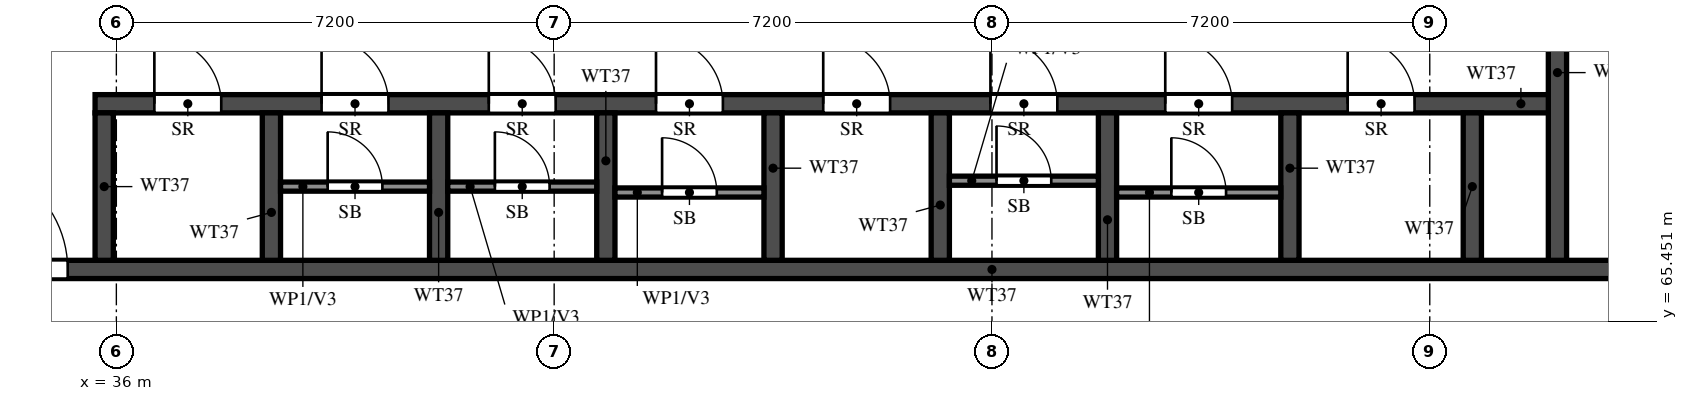
"""IFC4 building model, lengths in metres.
Left out: names, types, materials, properties, quantities, classifications, styles, units other than length and angle.
Written with IfcOpenShell. Run it as: python <this file> out.ifc"""

import sys

from ifc_helpers import new_model, si_unit, direction, frame, frame_2d, origin, place, context, subcontext, project, spatial, rectangle, extrude, element, fill, save


model = new_model("IFC4")
c1 = context("Model", 3, precision=1e-05, world=origin(), true_north=direction((0.0, 1.0)))
c2 = subcontext(c1, "Body", "Model", "MODEL_VIEW")
j1 = project(units=[si_unit("LENGTHUNIT", "METRE"), si_unit("PLANEANGLEUNIT", "RADIAN")], contexts=[c1])
p1 = place(None, origin())
s1 = spatial("IfcSite", under=j1, at=p1, CompositionType="ELEMENT")
p2 = place(p1, origin())
s2 = spatial("IfcBuilding", under=s1, at=p2, CompositionType="ELEMENT")
p3 = place(p2, frame((0.0, 0.0, 218.5)))
s3 = spatial("IfcBuildingStorey", under=s2, at=p3, CompositionType="ELEMENT", Elevation=218.5)
p4 = place(p3, frame((29.2, 66.3, 0.0), z_axis=(0.0, 0.0, 1.0), x_axis=(1.0, 0.0, 0.0)))
e1 = element("IfcWall", 1, at=p4, inside=s3, PredefinedType="SHEAR", context=c2, shape_type="SweptSolid", body=[
    extrude(rectangle(XDim=42.4, YDim=0.3, at=frame_2d((21.2, 0.0))), origin(), (0.0, 0.0, 1.0), 3.22),
])
p5 = place(p4, frame((1.425, 0.0, 0.0)))
e2 = element("IfcOpeningElement", 2, at=p5, cuts=e1, PredefinedType="OPENING", context=c2, shape_type="SweptSolid", body=[
    extrude(rectangle(XDim=1.1, YDim=2.1, at=frame_2d((0.55, 1.05))), frame((0.0, 0.16, 0.0), z_axis=(0.0, -1.0, 0.0), x_axis=(1.0, 0.0, 0.0)), (0.0, 0.0, 1.0), 0.32),
])
p6 = place(p4, frame((4.2, 0.0, 0.0)))
e3 = element("IfcOpeningElement", 3, at=p6, cuts=e1, PredefinedType="OPENING", context=c2, shape_type="SweptSolid", body=[
    extrude(rectangle(XDim=1.8, YDim=2.1, at=frame_2d((0.9, 1.05))), frame((0.0, 0.16, 0.0), z_axis=(0.0, -1.0, 0.0), x_axis=(1.0, 0.0, 0.0)), (0.0, 0.0, 1.0), 0.32),
])
p7 = place(p3, frame((35.65, 69.025, 0.0), z_axis=(0.0, 0.0, 1.0), x_axis=(1.0, 0.0, 0.0)))
e4 = element("IfcWall", 4, at=p7, inside=s3, PredefinedType="SHEAR", context=c2, shape_type="SweptSolid", body=[
    extrude(rectangle(XDim=24.05, YDim=0.3, at=frame_2d((12.025, 0.0))), origin(), (0.0, 0.0, 1.0), 3.22),
])
p8 = place(p7, frame((0.975, 0.0, 0.0)))
e5 = element("IfcOpeningElement", 5, at=p8, cuts=e4, PredefinedType="OPENING", context=c2, shape_type="SweptSolid", body=[
    extrude(rectangle(XDim=1.1, YDim=2.1, at=frame_2d((0.55, 1.05))), frame((0.0, 0.16, 0.0), z_axis=(0.0, -1.0, 0.0), x_axis=(1.0, 0.0, 0.0)), (0.0, 0.0, 1.0), 0.32),
])
p9 = place(p7, frame((3.725, 0.0, 0.0)))
e6 = element("IfcOpeningElement", 6, at=p9, cuts=e4, PredefinedType="OPENING", context=c2, shape_type="SweptSolid", body=[
    extrude(rectangle(XDim=1.1, YDim=2.1, at=frame_2d((0.55, 1.05))), frame((0.0, 0.16, 0.0), z_axis=(0.0, -1.0, 0.0), x_axis=(1.0, 0.0, 0.0)), (0.0, 0.0, 1.0), 0.32),
])
p10 = place(p7, frame((6.475, 0.0, 0.0)))
e7 = element("IfcOpeningElement", 7, at=p10, cuts=e4, PredefinedType="OPENING", context=c2, shape_type="SweptSolid", body=[
    extrude(rectangle(XDim=1.1, YDim=2.1, at=frame_2d((0.55, 1.05))), frame((0.0, 0.16, 0.0), z_axis=(0.0, -1.0, 0.0), x_axis=(1.0, 0.0, 0.0)), (0.0, 0.0, 1.0), 0.32),
])
p11 = place(p7, frame((9.225, 0.0, 0.0)))
e8 = element("IfcOpeningElement", 8, at=p11, cuts=e4, PredefinedType="OPENING", context=c2, shape_type="SweptSolid", body=[
    extrude(rectangle(XDim=1.1, YDim=2.1, at=frame_2d((0.55, 1.05))), frame((0.0, 0.16, 0.0), z_axis=(0.0, -1.0, 0.0), x_axis=(1.0, 0.0, 0.0)), (0.0, 0.0, 1.0), 0.32),
])
p12 = place(p7, frame((11.975, 0.0, 0.0)))
e9 = element("IfcOpeningElement", 9, at=p12, cuts=e4, PredefinedType="OPENING", context=c2, shape_type="SweptSolid", body=[
    extrude(rectangle(XDim=1.1, YDim=2.1, at=frame_2d((0.55, 1.05))), frame((0.0, 0.16, 0.0), z_axis=(0.0, -1.0, 0.0), x_axis=(1.0, 0.0, 0.0)), (0.0, 0.0, 1.0), 0.32),
])
p13 = place(p7, frame((14.725, 0.0, 0.0)))
e10 = element("IfcOpeningElement", 10, at=p13, cuts=e4, PredefinedType="OPENING", context=c2, shape_type="SweptSolid", body=[
    extrude(rectangle(XDim=1.1, YDim=2.1, at=frame_2d((0.55, 1.05))), frame((0.0, 0.16, 0.0), z_axis=(0.0, -1.0, 0.0), x_axis=(1.0, 0.0, 0.0)), (0.0, 0.0, 1.0), 0.32),
])
p14 = place(p7, frame((17.6, 0.0, 0.0)))
e11 = element("IfcOpeningElement", 11, at=p14, cuts=e4, PredefinedType="OPENING", context=c2, shape_type="SweptSolid", body=[
    extrude(rectangle(XDim=1.1, YDim=2.1, at=frame_2d((0.55, 1.05))), frame((0.0, 0.16, 0.0), z_axis=(0.0, -1.0, 0.0), x_axis=(1.0, 0.0, 0.0)), (0.0, 0.0, 1.0), 0.32),
])
p15 = place(p7, frame((20.6, 0.0, 0.0)))
e12 = element("IfcOpeningElement", 12, at=p15, cuts=e4, PredefinedType="OPENING", context=c2, shape_type="SweptSolid", body=[
    extrude(rectangle(XDim=1.1, YDim=2.1, at=frame_2d((0.55, 1.05))), frame((0.0, 0.16, 0.0), z_axis=(0.0, -1.0, 0.0), x_axis=(1.0, 0.0, 0.0)), (0.0, 0.0, 1.0), 0.32),
])
p16 = place(p3, frame((59.7, 66.45, 0.0), z_axis=(0.0, 0.0, 1.0), x_axis=(0.0, 1.0, 0.0)))
e13 = element("IfcWall", 13, at=p16, inside=s3, PredefinedType="SHEAR", context=c2, shape_type="SweptSolid", body=[
    extrude(rectangle(XDim=6.175, YDim=0.3, at=frame_2d((3.087, 0.0))), origin(), (0.0, 0.0, 1.0), 3.22),
])
p17 = place(p16, frame((3.85, 0.0, 0.0)))
e14 = element("IfcOpeningElement", 14, at=p17, cuts=e13, PredefinedType="OPENING", context=c2, shape_type="SweptSolid", body=[
    extrude(rectangle(XDim=1.2, YDim=2.1, at=frame_2d((0.6, 1.05))), frame((0.0, 0.16, 0.0), z_axis=(0.0, -1.0, 0.0), x_axis=(1.0, 0.0, 0.0)), (0.0, 0.0, 1.0), 0.32),
])
for number, where, z_axis, x_axis in (
    (15, (35.8, 66.45, 0.0), (0.0, 0.0, 1.0), (0.0, 1.0, 0.0)),
    (16, (38.55, 66.45, 0.0), (0.0, 0.0, 1.0), (0.0, 1.0, 0.0)),
    (17, (41.3, 66.45, 0.0), (0.0, 0.0, 1.0), (0.0, 1.0, 0.0)),
    (18, (44.05, 66.45, 0.0), (0.0, 0.0, 1.0), (0.0, 1.0, 0.0)),
    (19, (46.8, 66.45, 0.0), (0.0, 0.0, 1.0), (0.0, 1.0, 0.0)),
    (20, (49.55, 66.45, 0.0), (0.0, 0.0, 1.0), (0.0, 1.0, 0.0)),
    (21, (52.3, 66.45, 0.0), (0.0, 0.0, 1.0), (0.0, 1.0, 0.0)),
    (22, (55.3, 66.45, 0.0), (0.0, 0.0, 1.0), (0.0, 1.0, 0.0)),
    (23, (58.3, 66.45, 0.0), (0.0, 0.0, 1.0), (0.0, 1.0, 0.0)),
):
    element("IfcWall", number, at=place(p3, frame(where, z_axis=z_axis, x_axis=x_axis)), inside=s3, PredefinedType="SHEAR", context=c2, shape_type="SweptSolid", body=[
        extrude(rectangle(XDim=2.425, YDim=0.3, at=frame_2d((1.212, 0.0))), origin(), (0.0, 0.0, 1.0), 3.22),
    ])
p18 = place(p3, frame((38.7, 67.663, 0.0), z_axis=(0.0, 0.0, 1.0), x_axis=(1.0, 0.0, 0.0)))
e24 = element("IfcWall", 24, at=p18, inside=s3, PredefinedType="PARTITIONING", context=c2, shape_type="SweptSolid", body=[
    extrude(rectangle(XDim=2.45, YDim=0.15, at=frame_2d((1.225, 0.0))), origin(), (0.0, 0.0, 1.0), 3.22),
])
p19 = place(p18, frame((0.775, 0.0, 0.0)))
e25 = element("IfcOpeningElement", 25, at=p19, cuts=e24, PredefinedType="OPENING", context=c2, shape_type="SweptSolid", body=[
    extrude(rectangle(XDim=0.9, YDim=2.1, at=frame_2d((0.45, 1.05))), frame((0.0, 0.085, 0.0), z_axis=(0.0, -1.0, 0.0), x_axis=(1.0, 0.0, 0.0)), (0.0, 0.0, 1.0), 0.17),
])
p20 = place(p3, frame((41.45, 67.663, 0.0), z_axis=(0.0, 0.0, 1.0), x_axis=(1.0, 0.0, 0.0)))
e26 = element("IfcWall", 26, at=p20, inside=s3, PredefinedType="PARTITIONING", context=c2, shape_type="SweptSolid", body=[
    extrude(rectangle(XDim=2.45, YDim=0.15, at=frame_2d((1.225, 0.0))), origin(), (0.0, 0.0, 1.0), 3.22),
])
p21 = place(p20, frame((0.775, 0.0, 0.0)))
e27 = element("IfcOpeningElement", 27, at=p21, cuts=e26, PredefinedType="OPENING", context=c2, shape_type="SweptSolid", body=[
    extrude(rectangle(XDim=0.9, YDim=2.1, at=frame_2d((0.45, 1.05))), frame((0.0, 0.085, 0.0), z_axis=(0.0, -1.0, 0.0), x_axis=(1.0, 0.0, 0.0)), (0.0, 0.0, 1.0), 0.17),
])
p22 = place(p3, frame((44.2, 67.565, 0.0), z_axis=(0.0, 0.0, 1.0), x_axis=(1.0, 0.0, 0.0)))
e28 = element("IfcWall", 28, at=p22, inside=s3, PredefinedType="PARTITIONING", context=c2, shape_type="SweptSolid", body=[
    extrude(rectangle(XDim=2.45, YDim=0.15, at=frame_2d((1.225, 0.0))), origin(), (0.0, 0.0, 1.0), 3.22),
])
p23 = place(p22, frame((0.775, 0.0, 0.0)))
e29 = element("IfcOpeningElement", 29, at=p23, cuts=e28, PredefinedType="OPENING", context=c2, shape_type="SweptSolid", body=[
    extrude(rectangle(XDim=0.9, YDim=2.1, at=frame_2d((0.45, 1.05))), frame((0.0, 0.085, 0.0), z_axis=(0.0, -1.0, 0.0), x_axis=(1.0, 0.0, 0.0)), (0.0, 0.0, 1.0), 0.17),
])
p24 = place(p3, frame((49.7, 67.76, 0.0), z_axis=(0.0, 0.0, 1.0), x_axis=(1.0, 0.0, 0.0)))
e30 = element("IfcWall", 30, at=p24, inside=s3, PredefinedType="PARTITIONING", context=c2, shape_type="SweptSolid", body=[
    extrude(rectangle(XDim=2.45, YDim=0.15, at=frame_2d((1.225, 0.0))), origin(), (0.0, 0.0, 1.0), 3.22),
])
p25 = place(p24, frame((0.775, 0.0, 0.0)))
e31 = element("IfcOpeningElement", 31, at=p25, cuts=e30, PredefinedType="OPENING", context=c2, shape_type="SweptSolid", body=[
    extrude(rectangle(XDim=0.9, YDim=2.1, at=frame_2d((0.45, 1.05))), frame((0.0, 0.085, 0.0), z_axis=(0.0, -1.0, 0.0), x_axis=(1.0, 0.0, 0.0)), (0.0, 0.0, 1.0), 0.17),
])
p26 = place(p3, frame((52.45, 67.565, 0.0), z_axis=(0.0, 0.0, 1.0), x_axis=(1.0, 0.0, 0.0)))
e32 = element("IfcWall", 32, at=p26, inside=s3, PredefinedType="PARTITIONING", context=c2, shape_type="SweptSolid", body=[
    extrude(rectangle(XDim=2.7, YDim=0.15, at=frame_2d((1.35, 0.0))), origin(), (0.0, 0.0, 1.0), 3.22),
])
p27 = place(p26, frame((0.9, 0.0, 0.0)))
e33 = element("IfcOpeningElement", 33, at=p27, cuts=e32, PredefinedType="OPENING", context=c2, shape_type="SweptSolid", body=[
    extrude(rectangle(XDim=0.9, YDim=2.1, at=frame_2d((0.45, 1.05))), frame((0.0, 0.085, 0.0), z_axis=(0.0, -1.0, 0.0), x_axis=(1.0, 0.0, 0.0)), (0.0, 0.0, 1.0), 0.17),
])
p28 = place(p6, origin())
e34 = element("IfcDoor", 34, at=p28, inside=s3, OperationType="DOUBLE_DOOR_SINGLE_SWING", PredefinedType="DOOR", context=c2, shape_type="SweptSolid", body=[
    extrude(rectangle(XDim=1.8, YDim=2.1, at=frame_2d((0.9, 1.05))), frame((0.0, 0.025, 0.0), z_axis=(0.0, -1.0, 0.0), x_axis=(1.0, 0.0, 0.0)), (0.0, 0.0, 1.0), 0.05),
])
fill(e3, e34)
p29 = place(p8, origin())
e35 = element("IfcDoor", 35, at=p29, inside=s3, OperationType="SINGLE_SWING_RIGHT", PredefinedType="DOOR", context=c2, shape_type="SweptSolid", body=[
    extrude(rectangle(XDim=1.1, YDim=2.1, at=frame_2d((0.55, 1.05))), frame((0.0, 0.025, 0.0), z_axis=(0.0, -1.0, 0.0), x_axis=(1.0, 0.0, 0.0)), (0.0, 0.0, 1.0), 0.05),
])
fill(e5, e35)
p30 = place(p9, origin())
e36 = element("IfcDoor", 36, at=p30, inside=s3, OperationType="SINGLE_SWING_LEFT", PredefinedType="DOOR", context=c2, shape_type="SweptSolid", body=[
    extrude(rectangle(XDim=1.1, YDim=2.1, at=frame_2d((0.55, 1.05))), frame((0.0, 0.025, 0.0), z_axis=(0.0, -1.0, 0.0), x_axis=(1.0, 0.0, 0.0)), (0.0, 0.0, 1.0), 0.05),
])
fill(e6, e36)
p31 = place(p19, origin())
e37 = element("IfcDoor", 37, at=p31, inside=s3, OperationType="SINGLE_SWING_LEFT", PredefinedType="DOOR", context=c2, shape_type="SweptSolid", body=[
    extrude(rectangle(XDim=0.9, YDim=2.1, at=frame_2d((0.45, 1.05))), frame((0.0, 0.025, 0.0), z_axis=(0.0, -1.0, 0.0), x_axis=(1.0, 0.0, 0.0)), (0.0, 0.0, 1.0), 0.05),
])
fill(e25, e37)
p32 = place(p10, origin())
e38 = element("IfcDoor", 38, at=p32, inside=s3, OperationType="SINGLE_SWING_RIGHT", PredefinedType="DOOR", context=c2, shape_type="SweptSolid", body=[
    extrude(rectangle(XDim=1.1, YDim=2.1, at=frame_2d((0.55, 1.05))), frame((0.0, 0.025, 0.0), z_axis=(0.0, -1.0, 0.0), x_axis=(1.0, 0.0, 0.0)), (0.0, 0.0, 1.0), 0.05),
])
fill(e7, e38)
p33 = place(p21, origin())
e39 = element("IfcDoor", 39, at=p33, inside=s3, OperationType="SINGLE_SWING_RIGHT", PredefinedType="DOOR", context=c2, shape_type="SweptSolid", body=[
    extrude(rectangle(XDim=0.9, YDim=2.1, at=frame_2d((0.45, 1.05))), frame((0.0, 0.025, 0.0), z_axis=(0.0, -1.0, 0.0), x_axis=(1.0, 0.0, 0.0)), (0.0, 0.0, 1.0), 0.05),
])
fill(e27, e39)
p34 = place(p11, origin())
e40 = element("IfcDoor", 40, at=p34, inside=s3, OperationType="SINGLE_SWING_LEFT", PredefinedType="DOOR", context=c2, shape_type="SweptSolid", body=[
    extrude(rectangle(XDim=1.1, YDim=2.1, at=frame_2d((0.55, 1.05))), frame((0.0, 0.025, 0.0), z_axis=(0.0, -1.0, 0.0), x_axis=(1.0, 0.0, 0.0)), (0.0, 0.0, 1.0), 0.05),
])
fill(e8, e40)
p35 = place(p23, origin())
e41 = element("IfcDoor", 41, at=p35, inside=s3, OperationType="SINGLE_SWING_LEFT", PredefinedType="DOOR", context=c2, shape_type="SweptSolid", body=[
    extrude(rectangle(XDim=0.9, YDim=2.1, at=frame_2d((0.45, 1.05))), frame((0.0, 0.025, 0.0), z_axis=(0.0, -1.0, 0.0), x_axis=(1.0, 0.0, 0.0)), (0.0, 0.0, 1.0), 0.05),
])
fill(e29, e41)
p36 = place(p12, origin())
e42 = element("IfcDoor", 42, at=p36, inside=s3, OperationType="SINGLE_SWING_RIGHT", PredefinedType="DOOR", context=c2, shape_type="SweptSolid", body=[
    extrude(rectangle(XDim=1.1, YDim=2.1, at=frame_2d((0.55, 1.05))), frame((0.0, 0.025, 0.0), z_axis=(0.0, -1.0, 0.0), x_axis=(1.0, 0.0, 0.0)), (0.0, 0.0, 1.0), 0.05),
])
fill(e9, e42)
p37 = place(p13, origin())
e43 = element("IfcDoor", 43, at=p37, inside=s3, OperationType="SINGLE_SWING_LEFT", PredefinedType="DOOR", context=c2, shape_type="SweptSolid", body=[
    extrude(rectangle(XDim=1.1, YDim=2.1, at=frame_2d((0.55, 1.05))), frame((0.0, 0.025, 0.0), z_axis=(0.0, -1.0, 0.0), x_axis=(1.0, 0.0, 0.0)), (0.0, 0.0, 1.0), 0.05),
])
fill(e10, e43)
p38 = place(p25, origin())
e44 = element("IfcDoor", 44, at=p38, inside=s3, OperationType="SINGLE_SWING_RIGHT", PredefinedType="DOOR", context=c2, shape_type="SweptSolid", body=[
    extrude(rectangle(XDim=0.9, YDim=2.1, at=frame_2d((0.45, 1.05))), frame((0.0, 0.025, 0.0), z_axis=(0.0, -1.0, 0.0), x_axis=(1.0, 0.0, 0.0)), (0.0, 0.0, 1.0), 0.05),
])
fill(e31, e44)
p39 = place(p14, origin())
e45 = element("IfcDoor", 45, at=p39, inside=s3, OperationType="SINGLE_SWING_RIGHT", PredefinedType="DOOR", context=c2, shape_type="SweptSolid", body=[
    extrude(rectangle(XDim=1.1, YDim=2.1, at=frame_2d((0.55, 1.05))), frame((0.0, 0.025, 0.0), z_axis=(0.0, -1.0, 0.0), x_axis=(1.0, 0.0, 0.0)), (0.0, 0.0, 1.0), 0.05),
])
fill(e11, e45)
p40 = place(p27, origin())
e46 = element("IfcDoor", 46, at=p40, inside=s3, OperationType="SINGLE_SWING_RIGHT", PredefinedType="DOOR", context=c2, shape_type="SweptSolid", body=[
    extrude(rectangle(XDim=0.9, YDim=2.1, at=frame_2d((0.45, 1.05))), frame((0.0, 0.025, 0.0), z_axis=(0.0, -1.0, 0.0), x_axis=(1.0, 0.0, 0.0)), (0.0, 0.0, 1.0), 0.05),
])
fill(e33, e46)
p41 = place(p15, origin())
e47 = element("IfcDoor", 47, at=p41, inside=s3, OperationType="SINGLE_SWING_RIGHT", PredefinedType="DOOR", context=c2, shape_type="SweptSolid", body=[
    extrude(rectangle(XDim=1.1, YDim=2.1, at=frame_2d((0.55, 1.05))), frame((0.0, 0.025, 0.0), z_axis=(0.0, -1.0, 0.0), x_axis=(1.0, 0.0, 0.0)), (0.0, 0.0, 1.0), 0.05),
])
fill(e12, e47)
save(model, sys.argv[1])
